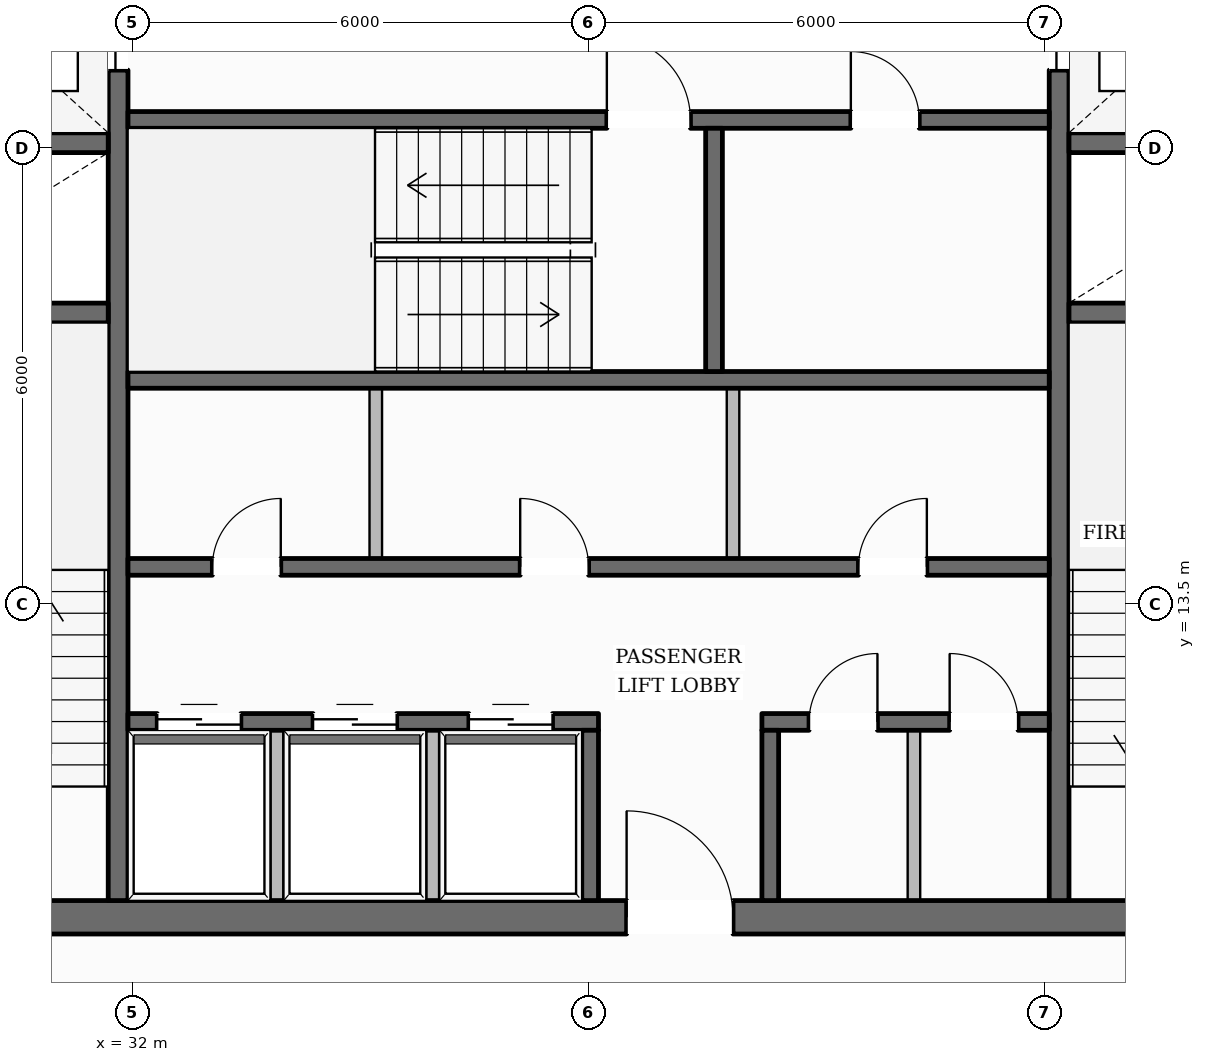
"""IFC4 building model, lengths in metres.
Left out: names, types, materials, properties, quantities, classifications, styles, units other than length and angle.
Written with IfcOpenShell. Run it as: python <this file> out.ifc"""

import sys

from ifc_helpers import new_model, si_unit, direction, frame, frame_2d, origin, place, context, subcontext, project, spatial, rectangle, extrude, element, fill, save


model = new_model("IFC4")
c1 = context("Model", 3, precision=1e-05, world=origin(), true_north=direction((0.0, 1.0)))
c2 = subcontext(c1, "Body", "Model", "MODEL_VIEW")
j1 = project(units=[si_unit("LENGTHUNIT", "METRE"), si_unit("PLANEANGLEUNIT", "RADIAN")], contexts=[c1])
p1 = place(None, origin())
s1 = spatial("IfcSite", under=j1, at=p1, CompositionType="ELEMENT")
p2 = place(p1, origin())
s2 = spatial("IfcBuilding", under=s1, at=p2, CompositionType="ELEMENT")
p3 = place(p2, frame((0.0, 0.0, 230.45)))
s3 = spatial("IfcBuildingStorey", under=s2, at=p3, CompositionType="ELEMENT", Elevation=230.45)
p4 = place(p3, frame((28.04, 9.38, 0.0), z_axis=(0.0, 0.0, 1.0), x_axis=(1.0, 0.0, 0.0)))
e1 = element("IfcWall", 1, at=p4, inside=s3, PredefinedType="SOLIDWALL", context=c2, shape_type="SweptSolid", body=[
    extrude(rectangle(XDim=19.92, YDim=0.44, at=frame_2d((9.96, 0.0))), origin(), (0.0, 0.0, 1.0), 3.43),
])
p5 = place(p4, frame((10.46, 0.0, 0.0)))
e2 = element("IfcOpeningElement", 2, at=p5, cuts=e1, PredefinedType="OPENING", context=c2, shape_type="SweptSolid", body=[
    extrude(rectangle(XDim=1.4, YDim=2.2, at=frame_2d((0.7, 1.1))), frame((0.0, 0.23, 0.0), z_axis=(0.0, -1.0, 0.0), x_axis=(1.0, 0.0, 0.0)), (0.0, 0.0, 1.0), 0.46),
])
p6 = place(p3, frame((31.81, 9.6, 0.0), z_axis=(0.0, 0.0, 1.0), x_axis=(0.0, 1.0, 0.0)))
e3 = element("IfcWall", 3, at=p6, inside=s3, PredefinedType="SHEAR", context=c2, shape_type="SweptSolid", body=[
    extrude(rectangle(XDim=13.0, YDim=0.26, at=frame_2d((6.5, 0.0))), origin(), (0.0, 0.0, 1.0), 3.43),
])
p7 = place(p6, frame((10.925, 0.0, 0.0)))
e4 = element("IfcOpeningElement", 4, at=p7, cuts=e3, PredefinedType="OPENING", context=c2, shape_type="SweptSolid", body=[
    extrude(rectangle(XDim=1.25, YDim=2.25, at=frame_2d((0.625, 1.125))), frame((0.0, 0.14, 0.0), z_axis=(0.0, -1.0, 0.0), x_axis=(1.0, 0.0, 0.0)), (0.0, 0.0, 1.0), 0.28),
])
p8 = place(p3, frame((44.19, 9.6, 0.0), z_axis=(0.0, 0.0, 1.0), x_axis=(0.0, 1.0, 0.0)))
e5 = element("IfcWall", 5, at=p8, inside=s3, PredefinedType="SHEAR", context=c2, shape_type="SweptSolid", body=[
    extrude(rectangle(XDim=13.0, YDim=0.26, at=frame_2d((6.5, 0.0))), origin(), (0.0, 0.0, 1.0), 3.43),
])
p9 = place(p8, frame((10.925, 0.0, 0.0)))
e6 = element("IfcOpeningElement", 6, at=p9, cuts=e5, PredefinedType="OPENING", context=c2, shape_type="SweptSolid", body=[
    extrude(rectangle(XDim=1.25, YDim=2.25, at=frame_2d((0.625, 1.125))), frame((0.0, 0.14, 0.0), z_axis=(0.0, -1.0, 0.0), x_axis=(1.0, 0.0, 0.0)), (0.0, 0.0, 1.0), 0.28),
])
for number, where, z_axis, x_axis in (
    (7, (28.48, 17.33, 0.0), (0.0, 0.0, 1.0), (1.0, 0.0, 0.0)),
    (8, (28.48, 19.57, 0.0), (0.0, 0.0, 1.0), (1.0, 0.0, 0.0)),
    (9, (44.32, 17.33, 0.0), (0.0, 0.0, 1.0), (1.0, 0.0, 0.0)),
    (10, (44.32, 19.57, 0.0), (0.0, 0.0, 1.0), (1.0, 0.0, 0.0)),
):
    element("IfcWall", number, at=place(p3, frame(where, z_axis=z_axis, x_axis=x_axis)), inside=s3, PredefinedType="SHEAR", context=c2, shape_type="SweptSolid", body=[
        extrude(rectangle(XDim=3.2, YDim=0.26, at=frame_2d((1.6, 0.0))), origin(), (0.0, 0.0, 1.0), 3.43),
    ])
p10 = place(p3, frame((31.94, 19.87, 0.0), z_axis=(0.0, 0.0, 1.0), x_axis=(1.0, 0.0, 0.0)))
e11 = element("IfcWall", 11, at=p10, inside=s3, PredefinedType="SOLIDWALL", context=c2, shape_type="SweptSolid", body=[
    extrude(rectangle(XDim=12.12, YDim=0.22, at=frame_2d((6.06, 0.0))), origin(), (0.0, 0.0, 1.0), 3.43),
])
p11 = place(p10, frame((6.3, 0.0, 0.0)))
e12 = element("IfcOpeningElement", 12, at=p11, cuts=e11, PredefinedType="OPENING", context=c2, shape_type="SweptSolid", body=[
    extrude(rectangle(XDim=1.1, YDim=2.15, at=frame_2d((0.55, 1.075))), frame((0.0, 0.12, 0.0), z_axis=(0.0, -1.0, 0.0), x_axis=(1.0, 0.0, 0.0)), (0.0, 0.0, 1.0), 0.24),
])
p12 = place(p10, frame((9.51, 0.0, 0.0)))
e13 = element("IfcOpeningElement", 13, at=p12, cuts=e11, PredefinedType="OPENING", context=c2, shape_type="SweptSolid", body=[
    extrude(rectangle(XDim=0.9, YDim=2.1, at=frame_2d((0.45, 1.05))), frame((0.0, 0.12, 0.0), z_axis=(0.0, -1.0, 0.0), x_axis=(1.0, 0.0, 0.0)), (0.0, 0.0, 1.0), 0.24),
])
p13 = place(p3, frame((31.94, 16.45, 0.0), z_axis=(0.0, 0.0, 1.0), x_axis=(1.0, 0.0, 0.0)))
e14 = element("IfcWall", 14, at=p13, inside=s3, PredefinedType="SOLIDWALL", context=c2, shape_type="SweptSolid", body=[
    extrude(rectangle(XDim=12.12, YDim=0.22, at=frame_2d((6.06, 0.0))), origin(), (0.0, 0.0, 1.0), 3.43),
])
p14 = place(p3, frame((39.65, 16.56, 0.0), z_axis=(0.0, 0.0, 1.0), x_axis=(0.0, 1.0, 0.0)))
e15 = element("IfcWall", 15, at=p14, inside=s3, PredefinedType="SOLIDWALL", context=c2, shape_type="SweptSolid", body=[
    extrude(rectangle(XDim=3.2, YDim=0.22, at=frame_2d((1.6, 0.0))), origin(), (0.0, 0.0, 1.0), 3.43),
])
p15 = place(p3, frame((31.94, 13.99, 0.0), z_axis=(0.0, 0.0, 1.0), x_axis=(1.0, 0.0, 0.0)))
e16 = element("IfcWall", 16, at=p15, inside=s3, PredefinedType="SOLIDWALL", context=c2, shape_type="SweptSolid", body=[
    extrude(rectangle(XDim=12.12, YDim=0.22, at=frame_2d((6.06, 0.0))), origin(), (0.0, 0.0, 1.0), 3.43),
])
p16 = place(p15, frame((1.11, 0.0, 0.0)))
e17 = element("IfcOpeningElement", 17, at=p16, cuts=e16, PredefinedType="OPENING", context=c2, shape_type="SweptSolid", body=[
    extrude(rectangle(XDim=0.9, YDim=2.1, at=frame_2d((0.45, 1.05))), frame((0.0, 0.12, 0.0), z_axis=(0.0, -1.0, 0.0), x_axis=(1.0, 0.0, 0.0)), (0.0, 0.0, 1.0), 0.24),
])
p17 = place(p15, frame((5.16, 0.0, 0.0)))
e18 = element("IfcOpeningElement", 18, at=p17, cuts=e16, PredefinedType="OPENING", context=c2, shape_type="SweptSolid", body=[
    extrude(rectangle(XDim=0.9, YDim=2.1, at=frame_2d((0.45, 1.05))), frame((0.0, 0.12, 0.0), z_axis=(0.0, -1.0, 0.0), x_axis=(1.0, 0.0, 0.0)), (0.0, 0.0, 1.0), 0.24),
])
p18 = place(p15, frame((9.61, 0.0, 0.0)))
e19 = element("IfcOpeningElement", 19, at=p18, cuts=e16, PredefinedType="OPENING", context=c2, shape_type="SweptSolid", body=[
    extrude(rectangle(XDim=0.9, YDim=2.1, at=frame_2d((0.45, 1.05))), frame((0.0, 0.12, 0.0), z_axis=(0.0, -1.0, 0.0), x_axis=(1.0, 0.0, 0.0)), (0.0, 0.0, 1.0), 0.24),
])
p19 = place(p3, frame((31.94, 11.95, 0.0), z_axis=(0.0, 0.0, 1.0), x_axis=(1.0, 0.0, 0.0)))
e20 = element("IfcWall", 20, at=p19, inside=s3, PredefinedType="SOLIDWALL", context=c2, shape_type="SweptSolid", body=[
    extrude(rectangle(XDim=6.19, YDim=0.22, at=frame_2d((3.095, 0.0))), origin(), (0.0, 0.0, 1.0), 3.43),
])
p20 = place(p19, frame((0.385, 0.0, 0.0)))
e21 = element("IfcOpeningElement", 21, at=p20, cuts=e20, PredefinedType="OPENING", context=c2, shape_type="SweptSolid", body=[
    extrude(rectangle(XDim=1.1, YDim=2.2, at=frame_2d((0.55, 1.1))), frame((0.0, 0.12, 0.0), z_axis=(0.0, -1.0, 0.0), x_axis=(1.0, 0.0, 0.0)), (0.0, 0.0, 1.0), 0.24),
])
p21 = place(p19, frame((2.435, 0.0, 0.0)))
e22 = element("IfcOpeningElement", 22, at=p21, cuts=e20, PredefinedType="OPENING", context=c2, shape_type="SweptSolid", body=[
    extrude(rectangle(XDim=1.1, YDim=2.2, at=frame_2d((0.55, 1.1))), frame((0.0, 0.12, 0.0), z_axis=(0.0, -1.0, 0.0), x_axis=(1.0, 0.0, 0.0)), (0.0, 0.0, 1.0), 0.24),
])
p22 = place(p19, frame((4.485, 0.0, 0.0)))
e23 = element("IfcOpeningElement", 23, at=p22, cuts=e20, PredefinedType="OPENING", context=c2, shape_type="SweptSolid", body=[
    extrude(rectangle(XDim=1.1, YDim=2.2, at=frame_2d((0.55, 1.1))), frame((0.0, 0.12, 0.0), z_axis=(0.0, -1.0, 0.0), x_axis=(1.0, 0.0, 0.0)), (0.0, 0.0, 1.0), 0.24),
])
p23 = place(p3, frame((40.28, 11.95, 0.0), z_axis=(0.0, 0.0, 1.0), x_axis=(1.0, 0.0, 0.0)))
e24 = element("IfcWall", 24, at=p23, inside=s3, PredefinedType="SOLIDWALL", context=c2, shape_type="SweptSolid", body=[
    extrude(rectangle(XDim=3.78, YDim=0.22, at=frame_2d((1.89, 0.0))), origin(), (0.0, 0.0, 1.0), 3.43),
])
p24 = place(p23, frame((0.62, 0.0, 0.0)))
e25 = element("IfcOpeningElement", 25, at=p24, cuts=e24, PredefinedType="OPENING", context=c2, shape_type="SweptSolid", body=[
    extrude(rectangle(XDim=0.9, YDim=2.1, at=frame_2d((0.45, 1.05))), frame((0.0, 0.12, 0.0), z_axis=(0.0, -1.0, 0.0), x_axis=(1.0, 0.0, 0.0)), (0.0, 0.0, 1.0), 0.24),
])
p25 = place(p23, frame((2.47, 0.0, 0.0)))
e26 = element("IfcOpeningElement", 26, at=p25, cuts=e24, PredefinedType="OPENING", context=c2, shape_type="SweptSolid", body=[
    extrude(rectangle(XDim=0.9, YDim=2.1, at=frame_2d((0.45, 1.05))), frame((0.0, 0.12, 0.0), z_axis=(0.0, -1.0, 0.0), x_axis=(1.0, 0.0, 0.0)), (0.0, 0.0, 1.0), 0.24),
])
for number, where, z_axis, x_axis in (
    (27, (38.02, 9.6, 0.0), (0.0, 0.0, 1.0), (0.0, 1.0, 0.0)),
    (28, (40.39, 9.6, 0.0), (0.0, 0.0, 1.0), (0.0, 1.0, 0.0)),
):
    element("IfcWall", number, at=place(p3, frame(where, z_axis=z_axis, x_axis=x_axis)), inside=s3, PredefinedType="SOLIDWALL", context=c2, shape_type="SweptSolid", body=[
        extrude(rectangle(XDim=2.24, YDim=0.22, at=frame_2d((1.12, 0.0))), origin(), (0.0, 0.0, 1.0), 3.43),
    ])
p26 = place(p3, frame((14.597, 10.907, 0.0), z_axis=(0.0, 0.0, 1.0), x_axis=(0.494693460531, 0.869067534837, 0.0)))
e29 = element("IfcWall", 29, at=p26, inside=s3, PredefinedType="STANDARD", context=c2, shape_type="SweptSolid", body=[
    extrude(rectangle(XDim=39.744, YDim=0.35, at=frame_2d((19.872, 0.0))), origin(), (0.0, 0.0, 1.0), 2.962),
])
p27 = place(p26, frame((35.308, 0.0, 0.55)))
e30 = element("IfcOpeningElement", 30, at=p27, cuts=e29, PredefinedType="OPENING", context=c2, shape_type="SweptSolid", body=[
    extrude(rectangle(XDim=1.45, YDim=1.6, at=frame_2d((0.725, 0.8))), frame((0.0, 0.185, 0.0), z_axis=(0.0, -1.0, 0.0), x_axis=(1.0, 0.0, 0.0)), (0.0, 0.0, 1.0), 0.37),
])
p28 = place(p26, frame((28.843, 0.0, 0.55)))
e31 = element("IfcOpeningElement", 31, at=p28, cuts=e29, PredefinedType="OPENING", context=c2, shape_type="SweptSolid", body=[
    extrude(rectangle(XDim=1.45, YDim=1.6, at=frame_2d((0.725, 0.8))), frame((0.0, 0.185, 0.0), z_axis=(0.0, -1.0, 0.0), x_axis=(1.0, 0.0, 0.0)), (0.0, 0.0, 1.0), 0.37),
])
p29 = place(p26, frame((22.377, 0.0, 0.55)))
e32 = element("IfcOpeningElement", 32, at=p29, cuts=e29, PredefinedType="OPENING", context=c2, shape_type="SweptSolid", body=[
    extrude(rectangle(XDim=1.45, YDim=1.6, at=frame_2d((0.725, 0.8))), frame((0.0, 0.185, 0.0), z_axis=(0.0, -1.0, 0.0), x_axis=(1.0, 0.0, 0.0)), (0.0, 0.0, 1.0), 0.37),
])
p30 = place(p26, frame((9.446, 0.0, 0.55)))
e33 = element("IfcOpeningElement", 33, at=p30, cuts=e29, PredefinedType="OPENING", context=c2, shape_type="SweptSolid", body=[
    extrude(rectangle(XDim=1.45, YDim=1.6, at=frame_2d((0.725, 0.8))), frame((0.0, 0.185, 0.0), z_axis=(0.0, -1.0, 0.0), x_axis=(1.0, 0.0, 0.0)), (0.0, 0.0, 1.0), 0.37),
])
p31 = place(p26, frame((2.98, 0.0, 0.55)))
e34 = element("IfcOpeningElement", 34, at=p31, cuts=e29, PredefinedType="OPENING", context=c2, shape_type="SweptSolid", body=[
    extrude(rectangle(XDim=1.45, YDim=1.6, at=frame_2d((0.725, 0.8))), frame((0.0, 0.185, 0.0), z_axis=(0.0, -1.0, 0.0), x_axis=(1.0, 0.0, 0.0)), (0.0, 0.0, 1.0), 0.37),
])
p32 = place(p3, frame((41.688, 45.48, 0.0), z_axis=(0.0, 0.0, 1.0), x_axis=(0.491295447758, -0.870992986775, 0.0)))
e35 = element("IfcWall", 35, at=p32, inside=s3, PredefinedType="STANDARD", context=c2, shape_type="SweptSolid", body=[
    extrude(rectangle(XDim=39.483, YDim=0.35, at=frame_2d((19.742, 0.0))), origin(), (0.0, 0.0, 1.0), 2.962),
])
p33 = place(p32, frame((9.471, 0.0, 0.0)))
e36 = element("IfcOpeningElement", 36, at=p33, cuts=e35, PredefinedType="OPENING", context=c2, shape_type="SweptSolid", body=[
    extrude(rectangle(XDim=1.0, YDim=2.2, at=frame_2d((0.5, 1.1))), frame((0.0, 0.185, 0.0), z_axis=(0.0, -1.0, 0.0), x_axis=(1.0, 0.0, 0.0)), (0.0, 0.0, 1.0), 0.37),
])
p34 = place(p32, frame((35.076, 0.0, 0.55)))
e37 = element("IfcOpeningElement", 37, at=p34, cuts=e35, PredefinedType="OPENING", context=c2, shape_type="SweptSolid", body=[
    extrude(rectangle(XDim=1.45, YDim=1.6, at=frame_2d((0.725, 0.8))), frame((0.0, 0.185, 0.0), z_axis=(0.0, -1.0, 0.0), x_axis=(1.0, 0.0, 0.0)), (0.0, 0.0, 1.0), 0.37),
])
p35 = place(p32, frame((28.654, 0.0, 0.55)))
e38 = element("IfcOpeningElement", 38, at=p35, cuts=e35, PredefinedType="OPENING", context=c2, shape_type="SweptSolid", body=[
    extrude(rectangle(XDim=1.45, YDim=1.6, at=frame_2d((0.725, 0.8))), frame((0.0, 0.185, 0.0), z_axis=(0.0, -1.0, 0.0), x_axis=(1.0, 0.0, 0.0)), (0.0, 0.0, 1.0), 0.37),
])
p36 = place(p32, frame((22.232, 0.0, 0.55)))
e39 = element("IfcOpeningElement", 39, at=p36, cuts=e35, PredefinedType="OPENING", context=c2, shape_type="SweptSolid", body=[
    extrude(rectangle(XDim=1.45, YDim=1.6, at=frame_2d((0.725, 0.8))), frame((0.0, 0.185, 0.0), z_axis=(0.0, -1.0, 0.0), x_axis=(1.0, 0.0, 0.0)), (0.0, 0.0, 1.0), 0.37),
])
p37 = place(p32, frame((2.967, 0.0, 0.55)))
e40 = element("IfcOpeningElement", 40, at=p37, cuts=e35, PredefinedType="OPENING", context=c2, shape_type="SweptSolid", body=[
    extrude(rectangle(XDim=1.45, YDim=1.6, at=frame_2d((0.725, 0.8))), frame((0.0, 0.185, 0.0), z_axis=(0.0, -1.0, 0.0), x_axis=(1.0, 0.0, 0.0)), (0.0, 0.0, 1.0), 0.37),
])
for number, where, z_axis, x_axis in (
    (41, (33.9, 9.52, 0.0), (0.0, 0.0, 1.0), (0.0, 1.0, 0.0)),
    (42, (35.95, 9.52, 0.0), (0.0, 0.0, 1.0), (0.0, 1.0, 0.0)),
):
    element("IfcWall", number, at=place(p3, frame(where, z_axis=z_axis, x_axis=x_axis)), inside=s3, PredefinedType="PARTITIONING", context=c2, shape_type="SweptSolid", body=[
        extrude(rectangle(XDim=2.32, YDim=0.165, at=frame_2d((1.16, 0.0))), origin(), (0.0, 0.0, 1.0), 3.43),
    ])
for number, where, z_axis, x_axis in (
    (43, (35.2, 14.1, 0.0), (0.0, 0.0, 1.0), (0.0, 1.0, 0.0)),
    (44, (39.9, 14.1, 0.0), (0.0, 0.0, 1.0), (0.0, 1.0, 0.0)),
):
    element("IfcWall", number, at=place(p3, frame(where, z_axis=z_axis, x_axis=x_axis)), inside=s3, PredefinedType="PARTITIONING", context=c2, shape_type="SweptSolid", body=[
        extrude(rectangle(XDim=2.24, YDim=0.165, at=frame_2d((1.12, 0.0))), origin(), (0.0, 0.0, 1.0), 3.43),
    ])
p38 = place(p3, frame((42.28, 9.52, 0.0), z_axis=(0.0, 0.0, 1.0), x_axis=(0.0, 1.0, 0.0)))
e45 = element("IfcWall", 45, at=p38, inside=s3, PredefinedType="PARTITIONING", context=c2, shape_type="SweptSolid", body=[
    extrude(rectangle(XDim=2.32, YDim=0.165, at=frame_2d((1.16, 0.0))), origin(), (0.0, 0.0, 1.0), 3.43),
])
p39 = place(p11, origin())
e46 = element("IfcDoor", 46, at=p39, inside=s3, OperationType="SINGLE_SWING_LEFT", PredefinedType="DOOR", context=c2, shape_type="SweptSolid", body=[
    extrude(rectangle(XDim=1.1, YDim=2.15, at=frame_2d((0.55, 1.075))), frame((0.0, 0.025, 0.0), z_axis=(0.0, -1.0, 0.0), x_axis=(1.0, 0.0, 0.0)), (0.0, 0.0, 1.0), 0.05),
])
fill(e12, e46)
p40 = place(p7, origin())
e47 = element("IfcDoor", 47, at=p40, inside=s3, OperationType="DOUBLE_DOOR_SLIDING", PredefinedType="DOOR", context=c2, shape_type="SweptSolid", body=[
    extrude(rectangle(XDim=1.25, YDim=2.25, at=frame_2d((0.625, 1.125))), frame((0.0, 0.025, 0.0), z_axis=(0.0, -1.0, 0.0), x_axis=(1.0, 0.0, 0.0)), (0.0, 0.0, 1.0), 0.05),
])
fill(e4, e47)
p41 = place(p9, origin())
e48 = element("IfcDoor", 48, at=p41, inside=s3, OperationType="DOUBLE_DOOR_SLIDING", PredefinedType="DOOR", context=c2, shape_type="SweptSolid", body=[
    extrude(rectangle(XDim=1.25, YDim=2.25, at=frame_2d((0.625, 1.125))), frame((0.0, 0.025, 0.0), z_axis=(0.0, -1.0, 0.0), x_axis=(1.0, 0.0, 0.0)), (0.0, 0.0, 1.0), 0.05),
])
fill(e6, e48)
p42 = place(p5, origin())
e49 = element("IfcDoor", 49, at=p42, inside=s3, OperationType="SINGLE_SWING_LEFT", PredefinedType="DOOR", context=c2, shape_type="SweptSolid", body=[
    extrude(rectangle(XDim=1.4, YDim=2.2, at=frame_2d((0.7, 1.1))), frame((0.0, 0.025, 0.0), z_axis=(0.0, -1.0, 0.0), x_axis=(1.0, 0.0, 0.0)), (0.0, 0.0, 1.0), 0.05),
])
fill(e2, e49)
p43 = place(p20, origin())
e50 = element("IfcDoor", 50, at=p43, inside=s3, OperationType="DOUBLE_DOOR_SLIDING", PredefinedType="DOOR", context=c2, shape_type="SweptSolid", body=[
    extrude(rectangle(XDim=1.1, YDim=2.2, at=frame_2d((0.55, 1.1))), frame((0.0, 0.025, 0.0), z_axis=(0.0, -1.0, 0.0), x_axis=(1.0, 0.0, 0.0)), (0.0, 0.0, 1.0), 0.05),
])
fill(e21, e50)
p44 = place(p21, origin())
e51 = element("IfcDoor", 51, at=p44, inside=s3, OperationType="DOUBLE_DOOR_SLIDING", PredefinedType="DOOR", context=c2, shape_type="SweptSolid", body=[
    extrude(rectangle(XDim=1.1, YDim=2.2, at=frame_2d((0.55, 1.1))), frame((0.0, 0.025, 0.0), z_axis=(0.0, -1.0, 0.0), x_axis=(1.0, 0.0, 0.0)), (0.0, 0.0, 1.0), 0.05),
])
fill(e22, e51)
p45 = place(p22, origin())
e52 = element("IfcDoor", 52, at=p45, inside=s3, OperationType="DOUBLE_DOOR_SLIDING", PredefinedType="DOOR", context=c2, shape_type="SweptSolid", body=[
    extrude(rectangle(XDim=1.1, YDim=2.2, at=frame_2d((0.55, 1.1))), frame((0.0, 0.025, 0.0), z_axis=(0.0, -1.0, 0.0), x_axis=(1.0, 0.0, 0.0)), (0.0, 0.0, 1.0), 0.05),
])
fill(e23, e52)
p46 = place(p16, origin())
e53 = element("IfcDoor", 53, at=p46, inside=s3, OperationType="SINGLE_SWING_RIGHT", PredefinedType="DOOR", context=c2, shape_type="SweptSolid", body=[
    extrude(rectangle(XDim=0.9, YDim=2.1, at=frame_2d((0.45, 1.05))), frame((0.0, 0.025, 0.0), z_axis=(0.0, -1.0, 0.0), x_axis=(1.0, 0.0, 0.0)), (0.0, 0.0, 1.0), 0.05),
])
fill(e17, e53)
p47 = place(p17, origin())
e54 = element("IfcDoor", 54, at=p47, inside=s3, OperationType="SINGLE_SWING_LEFT", PredefinedType="DOOR", context=c2, shape_type="SweptSolid", body=[
    extrude(rectangle(XDim=0.9, YDim=2.1, at=frame_2d((0.45, 1.05))), frame((0.0, 0.025, 0.0), z_axis=(0.0, -1.0, 0.0), x_axis=(1.0, 0.0, 0.0)), (0.0, 0.0, 1.0), 0.05),
])
fill(e18, e54)
p48 = place(p18, origin())
e55 = element("IfcDoor", 55, at=p48, inside=s3, OperationType="SINGLE_SWING_RIGHT", PredefinedType="DOOR", context=c2, shape_type="SweptSolid", body=[
    extrude(rectangle(XDim=0.9, YDim=2.1, at=frame_2d((0.45, 1.05))), frame((0.0, 0.025, 0.0), z_axis=(0.0, -1.0, 0.0), x_axis=(1.0, 0.0, 0.0)), (0.0, 0.0, 1.0), 0.05),
])
fill(e19, e55)
p49 = place(p12, origin())
e56 = element("IfcDoor", 56, at=p49, inside=s3, OperationType="SINGLE_SWING_LEFT", PredefinedType="DOOR", context=c2, shape_type="SweptSolid", body=[
    extrude(rectangle(XDim=0.9, YDim=2.1, at=frame_2d((0.45, 1.05))), frame((0.0, 0.025, 0.0), z_axis=(0.0, -1.0, 0.0), x_axis=(1.0, 0.0, 0.0)), (0.0, 0.0, 1.0), 0.05),
])
fill(e13, e56)
p50 = place(p24, origin())
e57 = element("IfcDoor", 57, at=p50, inside=s3, OperationType="SINGLE_SWING_RIGHT", PredefinedType="DOOR", context=c2, shape_type="SweptSolid", body=[
    extrude(rectangle(XDim=0.9, YDim=2.1, at=frame_2d((0.45, 1.05))), frame((0.0, 0.025, 0.0), z_axis=(0.0, -1.0, 0.0), x_axis=(1.0, 0.0, 0.0)), (0.0, 0.0, 1.0), 0.05),
])
fill(e25, e57)
p51 = place(p25, origin())
e58 = element("IfcDoor", 58, at=p51, inside=s3, OperationType="SINGLE_SWING_LEFT", PredefinedType="DOOR", context=c2, shape_type="SweptSolid", body=[
    extrude(rectangle(XDim=0.9, YDim=2.1, at=frame_2d((0.45, 1.05))), frame((0.0, 0.025, 0.0), z_axis=(0.0, -1.0, 0.0), x_axis=(1.0, 0.0, 0.0)), (0.0, 0.0, 1.0), 0.05),
])
fill(e26, e58)
save(model, sys.argv[1])
